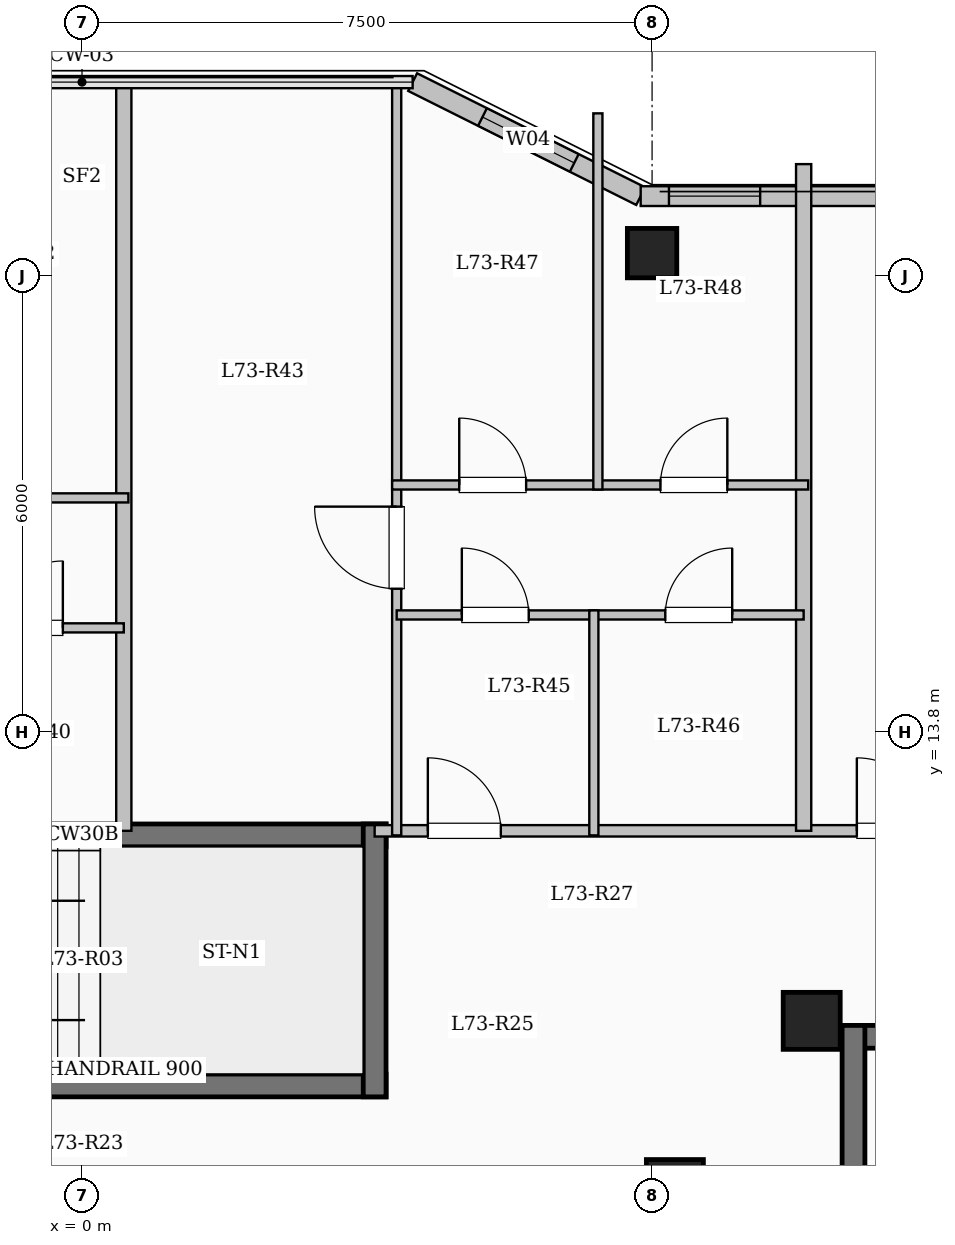
"""IFC4 building model, lengths in metres.
Left out: names, types, materials, properties, quantities, classifications, styles, units other than length and angle.
Written with IfcOpenShell. Run it as: python <this file> out.ifc"""

import sys

from ifc_helpers import new_model, si_unit, direction, frame, frame_2d, origin, origin_2d, place, context, subcontext, project, spatial, rectangle, extrude, element, fill, save


model = new_model("IFC4")
c1 = context("Model", 3, precision=1e-05, world=origin(), true_north=direction((0.0, 1.0)))
c2 = subcontext(c1, "Body", "Model", "MODEL_VIEW")
j1 = project(units=[si_unit("LENGTHUNIT", "METRE"), si_unit("PLANEANGLEUNIT", "RADIAN")], contexts=[c1])
p1 = place(None, origin())
s1 = spatial("IfcSite", under=j1, at=p1, CompositionType="ELEMENT")
p2 = place(p1, origin())
s2 = spatial("IfcBuilding", under=s1, at=p2, CompositionType="ELEMENT")
p3 = place(p2, frame((0.0, 0.0, 268.3)))
s3 = spatial("IfcBuildingStorey", under=s2, at=p3, CompositionType="ELEMENT", Elevation=268.3)
for number, where, z_axis, x_axis in (
    (1, (7.8, 7.8, 0.0), (0.0, 0.0, 1.0), (1.0, 0.0, 0.0)),
    (2, (9.6, 10.0, 0.0), (0.0, 0.0, 1.0), (1.0, 0.0, 0.0)),
):
    element("IfcColumn", number, at=place(p3, frame(where, z_axis=z_axis, x_axis=x_axis)), inside=s3, PredefinedType="COLUMN", context=c2, shape_type="SweptSolid", body=[
        extrude(rectangle(XDim=0.75, YDim=0.75, at=origin_2d()), origin(), (0.0, 0.0, 1.0), 3.35),
    ])
p4 = place(p3, frame((7.5, 20.1, 0.0), z_axis=(0.0, 0.0, 1.0), x_axis=(1.0, 0.0, 0.0)))
e3 = element("IfcColumn", 3, at=p4, inside=s3, PredefinedType="COLUMN", context=c2, shape_type="SweptSolid", body=[
    extrude(rectangle(XDim=0.65, YDim=0.65, at=origin_2d()), origin(), (0.0, 0.0, 1.0), 3.35),
])
p5 = place(p3, frame((4.35, 22.35, 0.0), z_axis=(0.0, 0.0, 1.0), x_axis=(0.894427191, -0.4472135955, 0.0)))
e4 = element("IfcWall", 4, at=p5, inside=s3, PredefinedType="SOLIDWALL", context=c2, shape_type="SweptSolid", body=[
    extrude(rectangle(XDim=3.354, YDim=0.26, at=frame_2d((1.677, 0.0))), origin(), (0.0, 0.0, 1.0), 3.05),
])
p6 = place(p5, frame((1.027, 0.0, 0.95)))
e5 = element("IfcOpeningElement", 5, at=p6, cuts=e4, PredefinedType="OPENING", context=c2, shape_type="SweptSolid", body=[
    extrude(rectangle(XDim=1.35, YDim=1.55, at=frame_2d((0.675, 0.775))), frame((0.0, 0.14, 0.0), z_axis=(0.0, -1.0, 0.0), x_axis=(1.0, 0.0, 0.0)), (0.0, 0.0, 1.0), 0.28),
])
p7 = place(p3, frame((7.35, 20.85, 0.0), z_axis=(0.0, 0.0, 1.0), x_axis=(1.0, 0.0, 0.0)))
e6 = element("IfcWall", 6, at=p7, inside=s3, PredefinedType="SOLIDWALL", context=c2, shape_type="SweptSolid", body=[
    extrude(rectangle(XDim=10.5, YDim=0.26, at=frame_2d((5.25, 0.0))), origin(), (0.0, 0.0, 1.0), 3.05),
])
p8 = place(p7, frame((0.372, 0.0, 0.95)))
e7 = element("IfcOpeningElement", 7, at=p8, cuts=e6, PredefinedType="OPENING", context=c2, shape_type="SweptSolid", body=[
    extrude(rectangle(XDim=1.2, YDim=1.5, at=frame_2d((0.6, 0.75))), frame((0.0, 0.14, 0.0), z_axis=(0.0, -1.0, 0.0), x_axis=(1.0, 0.0, 0.0)), (0.0, 0.0, 1.0), 0.28),
])
p9 = place(p7, frame((3.1, 0.0, 0.9)))
e8 = element("IfcOpeningElement", 8, at=p9, cuts=e6, PredefinedType="OPENING", context=c2, shape_type="SweptSolid", body=[
    extrude(rectangle(XDim=2.2, YDim=1.75, at=frame_2d((1.1, 0.875))), frame((0.0, 0.14, 0.0), z_axis=(0.0, -1.0, 0.0), x_axis=(1.0, 0.0, 0.0)), (0.0, 0.0, 1.0), 0.28),
])
p10 = place(p7, frame((7.525, 0.0, 0.9)))
e9 = element("IfcOpeningElement", 9, at=p10, cuts=e6, PredefinedType="OPENING", context=c2, shape_type="SweptSolid", body=[
    extrude(rectangle(XDim=1.65, YDim=1.6, at=frame_2d((0.825, 0.8))), frame((0.0, 0.14, 0.0), z_axis=(0.0, -1.0, 0.0), x_axis=(1.0, 0.0, 0.0)), (0.0, 0.0, 1.0), 0.28),
])
p11 = place(p3, frame((10.0, 9.79, 0.0), z_axis=(0.0, 0.0, 1.0), x_axis=(1.0, 0.0, 0.0)))
e10 = element("IfcWall", 10, at=p11, inside=s3, PredefinedType="SHEAR", context=c2, shape_type="SweptSolid", body=[
    extrude(rectangle(XDim=8.0, YDim=0.3, at=frame_2d((4.0, 0.0))), origin(), (0.0, 0.0, 1.0), 3.35),
])
p12 = place(p3, frame((10.15, 6.35, 0.0), z_axis=(0.0, 0.0, 1.0), x_axis=(0.0, 1.0, 0.0)))
e11 = element("IfcWall", 11, at=p12, inside=s3, PredefinedType="SHEAR", context=c2, shape_type="SweptSolid", body=[
    extrude(rectangle(XDim=3.59, YDim=0.3, at=frame_2d((1.795, 0.0))), origin(), (0.0, 0.0, 1.0), 3.35),
])
p13 = place(p3, frame((-4.0, 12.44, 0.0), z_axis=(0.0, 0.0, 1.0), x_axis=(1.0, 0.0, 0.0)))
e12 = element("IfcWall", 12, at=p13, inside=s3, PredefinedType="SHEAR", context=c2, shape_type="SweptSolid", body=[
    extrude(rectangle(XDim=8.0, YDim=0.3, at=frame_2d((4.0, 0.0))), origin(), (0.0, 0.0, 1.0), 3.35),
])
p14 = place(p3, frame((-4.0, 9.15, 0.0), z_axis=(0.0, 0.0, 1.0), x_axis=(1.0, 0.0, 0.0)))
e13 = element("IfcWall", 13, at=p14, inside=s3, PredefinedType="SHEAR", context=c2, shape_type="SweptSolid", body=[
    extrude(rectangle(XDim=8.0, YDim=0.3, at=frame_2d((4.0, 0.0))), origin(), (0.0, 0.0, 1.0), 3.35),
])
p15 = place(p14, frame((0.55, 0.0, 0.0)))
e14 = element("IfcOpeningElement", 14, at=p15, cuts=e13, PredefinedType="OPENING", context=c2, shape_type="SweptSolid", body=[
    extrude(rectangle(XDim=1.0, YDim=2.15, at=frame_2d((0.5, 1.075))), frame((0.0, 0.16, 0.0), z_axis=(0.0, -1.0, 0.0), x_axis=(1.0, 0.0, 0.0)), (0.0, 0.0, 1.0), 0.32),
])
p16 = place(p3, frame((3.85, 9.0, 0.0), z_axis=(0.0, 0.0, 1.0), x_axis=(0.0, 1.0, 0.0)))
e15 = element("IfcWall", 15, at=p16, inside=s3, PredefinedType="SHEAR", context=c2, shape_type="SweptSolid", body=[
    extrude(rectangle(XDim=3.59, YDim=0.3, at=frame_2d((1.795, 0.0))), origin(), (0.0, 0.0, 1.0), 3.35),
])
p17 = place(p3, frame((3.85, 12.5, 0.0), z_axis=(0.0, 0.0, 1.0), x_axis=(1.0, 0.0, 0.0)))
e16 = element("IfcWall", 16, at=p17, inside=s3, PredefinedType="PARTITIONING", context=c2, shape_type="SweptSolid", body=[
    extrude(rectangle(XDim=13.9, YDim=0.15, at=frame_2d((6.95, 0.0))), origin(), (0.0, 0.0, 1.0), 3.05),
])
p18 = place(p17, frame((0.7, 0.0, 0.0)))
e17 = element("IfcOpeningElement", 17, at=p18, cuts=e16, PredefinedType="OPENING", context=c2, shape_type="SweptSolid", body=[
    extrude(rectangle(XDim=0.96, YDim=2.15, at=frame_2d((0.48, 1.075))), frame((0.0, 0.085, 0.0), z_axis=(0.0, -1.0, 0.0), x_axis=(1.0, 0.0, 0.0)), (0.0, 0.0, 1.0), 0.17),
])
p19 = place(p17, frame((6.344, 0.0, 0.0)))
e18 = element("IfcOpeningElement", 18, at=p19, cuts=e16, PredefinedType="OPENING", context=c2, shape_type="SweptSolid", body=[
    extrude(rectangle(XDim=0.96, YDim=2.15, at=frame_2d((0.48, 1.075))), frame((0.0, 0.085, 0.0), z_axis=(0.0, -1.0, 0.0), x_axis=(1.0, 0.0, 0.0)), (0.0, 0.0, 1.0), 0.17),
])
p20 = place(p3, frame((0.55, 12.5, 0.0), z_axis=(0.0, 0.0, 1.0), x_axis=(0.0, 1.0, 0.0)))
e19 = element("IfcWall", 19, at=p20, inside=s3, PredefinedType="SOLIDWALL", context=c2, shape_type="SweptSolid", body=[
    extrude(rectangle(XDim=9.88, YDim=0.2, at=frame_2d((4.94, 0.0))), origin(), (0.0, 0.0, 1.0), 3.05),
])
p21 = place(p3, frame((-1.934, 15.17, 0.0), z_axis=(0.0, 0.0, 1.0), x_axis=(1.0, 0.0, 0.0)))
e20 = element("IfcWall", 20, at=p21, inside=s3, PredefinedType="PARTITIONING", context=c2, shape_type="SweptSolid", body=[
    extrude(rectangle(XDim=2.484, YDim=0.12, at=frame_2d((1.242, 0.0))), origin(), (0.0, 0.0, 1.0), 3.05),
])
p22 = place(p21, frame((0.802, 0.0, 0.0)))
e21 = element("IfcOpeningElement", 21, at=p22, cuts=e20, PredefinedType="OPENING", context=c2, shape_type="SweptSolid", body=[
    extrude(rectangle(XDim=0.88, YDim=2.1, at=frame_2d((0.44, 1.05))), frame((0.0, 0.07, 0.0), z_axis=(0.0, -1.0, 0.0), x_axis=(1.0, 0.0, 0.0)), (0.0, 0.0, 1.0), 0.14),
])
p23 = place(p3, frame((-5.208, 16.88, 0.0), z_axis=(0.0, 0.0, 1.0), x_axis=(1.0, 0.0, 0.0)))
e22 = element("IfcWall", 22, at=p23, inside=s3, PredefinedType="PARTITIONING", context=c2, shape_type="SweptSolid", body=[
    extrude(rectangle(XDim=5.818, YDim=0.12, at=frame_2d((2.909, 0.0))), origin(), (0.0, 0.0, 1.0), 2.735),
])
p24 = place(p23, frame((0.97, 0.0, 0.0)))
e23 = element("IfcOpeningElement", 23, at=p24, cuts=e22, PredefinedType="OPENING", context=c2, shape_type="SweptSolid", body=[
    extrude(rectangle(XDim=0.88, YDim=2.1, at=frame_2d((0.44, 1.05))), frame((0.0, 0.07, 0.0), z_axis=(0.0, -1.0, 0.0), x_axis=(1.0, 0.0, 0.0)), (0.0, 0.0, 1.0), 0.14),
])
p25 = place(p23, frame((3.788, 0.0, 0.0)))
e24 = element("IfcOpeningElement", 24, at=p25, cuts=e22, PredefinedType="OPENING", context=c2, shape_type="SweptSolid", body=[
    extrude(rectangle(XDim=0.88, YDim=2.1, at=frame_2d((0.44, 1.05))), frame((0.0, 0.07, 0.0), z_axis=(0.0, -1.0, 0.0), x_axis=(1.0, 0.0, 0.0)), (0.0, 0.0, 1.0), 0.14),
])
p26 = place(p3, frame((9.494, 12.5, 0.0), z_axis=(0.0, 0.0, 1.0), x_axis=(0.0, 1.0, 0.0)))
e25 = element("IfcWall", 25, at=p26, inside=s3, PredefinedType="SOLIDWALL", context=c2, shape_type="SweptSolid", body=[
    extrude(rectangle(XDim=8.771, YDim=0.2, at=frame_2d((4.385, 0.0))), origin(), (0.0, 0.0, 1.0), 3.05),
])
p27 = place(p3, frame((4.14, 12.44, 0.0), z_axis=(0.0, 0.0, 1.0), x_axis=(0.0, 1.0, 0.0)))
e26 = element("IfcWall", 26, at=p27, inside=s3, PredefinedType="PARTITIONING", context=c2, shape_type="SweptSolid", body=[
    extrude(rectangle(XDim=9.94, YDim=0.12, at=frame_2d((4.97, 0.0))), origin(), (0.0, 0.0, 1.0), 3.05),
])
p28 = place(p27, frame((3.245, 0.0, 0.0)))
e27 = element("IfcOpeningElement", 27, at=p28, cuts=e26, PredefinedType="OPENING", context=c2, shape_type="SweptSolid", body=[
    extrude(rectangle(XDim=1.08, YDim=2.15, at=frame_2d((0.54, 1.075))), frame((0.0, 0.07, 0.0), z_axis=(0.0, -1.0, 0.0), x_axis=(1.0, 0.0, 0.0)), (0.0, 0.0, 1.0), 0.14),
])
p29 = place(p3, frame((4.14, 15.34, 0.0), z_axis=(0.0, 0.0, 1.0), x_axis=(1.0, 0.0, 0.0)))
e28 = element("IfcWall", 28, at=p29, inside=s3, PredefinedType="PARTITIONING", context=c2, shape_type="SweptSolid", body=[
    extrude(rectangle(XDim=2.594, YDim=0.12, at=frame_2d((1.297, 0.0))), origin(), (0.0, 0.0, 1.0), 2.735),
])
p30 = place(p29, frame((0.857, 0.0, 0.0)))
e29 = element("IfcOpeningElement", 29, at=p30, cuts=e28, PredefinedType="OPENING", context=c2, shape_type="SweptSolid", body=[
    extrude(rectangle(XDim=0.88, YDim=2.1, at=frame_2d((0.44, 1.05))), frame((0.0, 0.07, 0.0), z_axis=(0.0, -1.0, 0.0), x_axis=(1.0, 0.0, 0.0)), (0.0, 0.0, 1.0), 0.14),
])
p31 = place(p3, frame((6.734, 15.34, 0.0), z_axis=(0.0, 0.0, 1.0), x_axis=(1.0, 0.0, 0.0)))
e30 = element("IfcWall", 30, at=p31, inside=s3, PredefinedType="PARTITIONING", context=c2, shape_type="SweptSolid", body=[
    extrude(rectangle(XDim=2.76, YDim=0.12, at=frame_2d((1.38, 0.0))), origin(), (0.0, 0.0, 1.0), 2.735),
])
p32 = place(p31, frame((0.94, 0.0, 0.0)))
e31 = element("IfcOpeningElement", 31, at=p32, cuts=e30, PredefinedType="OPENING", context=c2, shape_type="SweptSolid", body=[
    extrude(rectangle(XDim=0.88, YDim=2.1, at=frame_2d((0.44, 1.05))), frame((0.0, 0.07, 0.0), z_axis=(0.0, -1.0, 0.0), x_axis=(1.0, 0.0, 0.0)), (0.0, 0.0, 1.0), 0.14),
])
p33 = place(p3, frame((4.08, 17.05, 0.0), z_axis=(0.0, 0.0, 1.0), x_axis=(1.0, 0.0, 0.0)))
e32 = element("IfcWall", 32, at=p33, inside=s3, PredefinedType="PARTITIONING", context=c2, shape_type="SweptSolid", body=[
    extrude(rectangle(XDim=5.474, YDim=0.12, at=frame_2d((2.737, 0.0))), origin(), (0.0, 0.0, 1.0), 2.735),
])
p34 = place(p33, frame((0.883, 0.0, 0.0)))
e33 = element("IfcOpeningElement", 33, at=p34, cuts=e32, PredefinedType="OPENING", context=c2, shape_type="SweptSolid", body=[
    extrude(rectangle(XDim=0.88, YDim=2.1, at=frame_2d((0.44, 1.05))), frame((0.0, 0.07, 0.0), z_axis=(0.0, -1.0, 0.0), x_axis=(1.0, 0.0, 0.0)), (0.0, 0.0, 1.0), 0.14),
])
p35 = place(p33, frame((3.53, 0.0, 0.0)))
e34 = element("IfcOpeningElement", 34, at=p35, cuts=e32, PredefinedType="OPENING", context=c2, shape_type="SweptSolid", body=[
    extrude(rectangle(XDim=0.88, YDim=2.1, at=frame_2d((0.44, 1.05))), frame((0.0, 0.07, 0.0), z_axis=(0.0, -1.0, 0.0), x_axis=(1.0, 0.0, 0.0)), (0.0, 0.0, 1.0), 0.14),
])
p36 = place(p3, frame((6.734, 12.44, 0.0), z_axis=(0.0, 0.0, 1.0), x_axis=(0.0, 1.0, 0.0)))
e35 = element("IfcWall", 35, at=p36, inside=s3, PredefinedType="PARTITIONING", context=c2, shape_type="SweptSolid", body=[
    extrude(rectangle(XDim=2.96, YDim=0.12, at=frame_2d((1.48, 0.0))), origin(), (0.0, 0.0, 1.0), 3.05),
])
p37 = place(p3, frame((6.787, 16.99, 0.0), z_axis=(0.0, 0.0, 1.0), x_axis=(0.0, 1.0, 0.0)))
e36 = element("IfcWall", 36, at=p37, inside=s3, PredefinedType="PARTITIONING", context=c2, shape_type="SweptSolid", body=[
    extrude(rectangle(XDim=4.949, YDim=0.12, at=frame_2d((2.475, 0.0))), origin(), (0.0, 0.0, 1.0), 3.05),
])
p38 = place(p6, origin())
e37 = element("IfcWindow", 37, at=p38, inside=s3, PartitioningType="SINGLE_PANEL", PredefinedType="WINDOW", context=c2, shape_type="SweptSolid", body=[
    extrude(rectangle(XDim=1.35, YDim=1.55, at=frame_2d((0.675, 0.775))), frame((0.0, 0.03, 0.0), z_axis=(0.0, -1.0, 0.0), x_axis=(1.0, 0.0, 0.0)), (0.0, 0.0, 1.0), 0.06),
])
fill(e5, e37)
p39 = place(p8, origin())
e38 = element("IfcWindow", 38, at=p39, inside=s3, PartitioningType="SINGLE_PANEL", PredefinedType="WINDOW", context=c2, shape_type="SweptSolid", body=[
    extrude(rectangle(XDim=1.2, YDim=1.5, at=frame_2d((0.6, 0.75))), frame((0.0, 0.03, 0.0), z_axis=(0.0, -1.0, 0.0), x_axis=(1.0, 0.0, 0.0)), (0.0, 0.0, 1.0), 0.06),
])
fill(e7, e38)
p40 = place(p22, origin())
e39 = element("IfcDoor", 39, at=p40, inside=s3, OperationType="SINGLE_SWING_RIGHT", PredefinedType="DOOR", context=c2, shape_type="SweptSolid", body=[
    extrude(rectangle(XDim=0.88, YDim=2.1, at=frame_2d((0.44, 1.05))), frame((0.0, 0.025, 0.0), z_axis=(0.0, -1.0, 0.0), x_axis=(1.0, 0.0, 0.0)), (0.0, 0.0, 1.0), 0.05),
])
fill(e21, e39)
p41 = place(p18, origin())
e40 = element("IfcDoor", 40, at=p41, inside=s3, OperationType="SINGLE_SWING_LEFT", PredefinedType="DOOR", context=c2, shape_type="SweptSolid", body=[
    extrude(rectangle(XDim=0.96, YDim=2.15, at=frame_2d((0.48, 1.075))), frame((0.0, 0.025, 0.0), z_axis=(0.0, -1.0, 0.0), x_axis=(1.0, 0.0, 0.0)), (0.0, 0.0, 1.0), 0.05),
])
fill(e17, e40)
p42 = place(p28, origin())
e41 = element("IfcDoor", 41, at=p42, inside=s3, OperationType="SINGLE_SWING_RIGHT", PredefinedType="DOOR", context=c2, shape_type="SweptSolid", body=[
    extrude(rectangle(XDim=1.08, YDim=2.15, at=frame_2d((0.54, 1.075))), frame((0.0, 0.025, 0.0), z_axis=(0.0, -1.0, 0.0), x_axis=(1.0, 0.0, 0.0)), (0.0, 0.0, 1.0), 0.05),
])
fill(e27, e41)
p43 = place(p30, origin())
e42 = element("IfcDoor", 42, at=p43, inside=s3, OperationType="SINGLE_SWING_LEFT", PredefinedType="DOOR", context=c2, shape_type="SweptSolid", body=[
    extrude(rectangle(XDim=0.88, YDim=2.1, at=frame_2d((0.44, 1.05))), frame((0.0, 0.025, 0.0), z_axis=(0.0, -1.0, 0.0), x_axis=(1.0, 0.0, 0.0)), (0.0, 0.0, 1.0), 0.05),
])
fill(e29, e42)
p44 = place(p32, origin())
e43 = element("IfcDoor", 43, at=p44, inside=s3, OperationType="SINGLE_SWING_RIGHT", PredefinedType="DOOR", context=c2, shape_type="SweptSolid", body=[
    extrude(rectangle(XDim=0.88, YDim=2.1, at=frame_2d((0.44, 1.05))), frame((0.0, 0.025, 0.0), z_axis=(0.0, -1.0, 0.0), x_axis=(1.0, 0.0, 0.0)), (0.0, 0.0, 1.0), 0.05),
])
fill(e31, e43)
p45 = place(p34, origin())
e44 = element("IfcDoor", 44, at=p45, inside=s3, OperationType="SINGLE_SWING_LEFT", PredefinedType="DOOR", context=c2, shape_type="SweptSolid", body=[
    extrude(rectangle(XDim=0.88, YDim=2.1, at=frame_2d((0.44, 1.05))), frame((0.0, 0.025, 0.0), z_axis=(0.0, -1.0, 0.0), x_axis=(1.0, 0.0, 0.0)), (0.0, 0.0, 1.0), 0.05),
])
fill(e33, e44)
p46 = place(p35, origin())
e45 = element("IfcDoor", 45, at=p46, inside=s3, OperationType="SINGLE_SWING_RIGHT", PredefinedType="DOOR", context=c2, shape_type="SweptSolid", body=[
    extrude(rectangle(XDim=0.88, YDim=2.1, at=frame_2d((0.44, 1.05))), frame((0.0, 0.025, 0.0), z_axis=(0.0, -1.0, 0.0), x_axis=(1.0, 0.0, 0.0)), (0.0, 0.0, 1.0), 0.05),
])
fill(e34, e45)
p47 = place(p19, origin())
e46 = element("IfcDoor", 46, at=p47, inside=s3, OperationType="SINGLE_SWING_LEFT", PredefinedType="DOOR", context=c2, shape_type="SweptSolid", body=[
    extrude(rectangle(XDim=0.96, YDim=2.15, at=frame_2d((0.48, 1.075))), frame((0.0, 0.025, 0.0), z_axis=(0.0, -1.0, 0.0), x_axis=(1.0, 0.0, 0.0)), (0.0, 0.0, 1.0), 0.05),
])
fill(e18, e46)
save(model, sys.argv[1])
